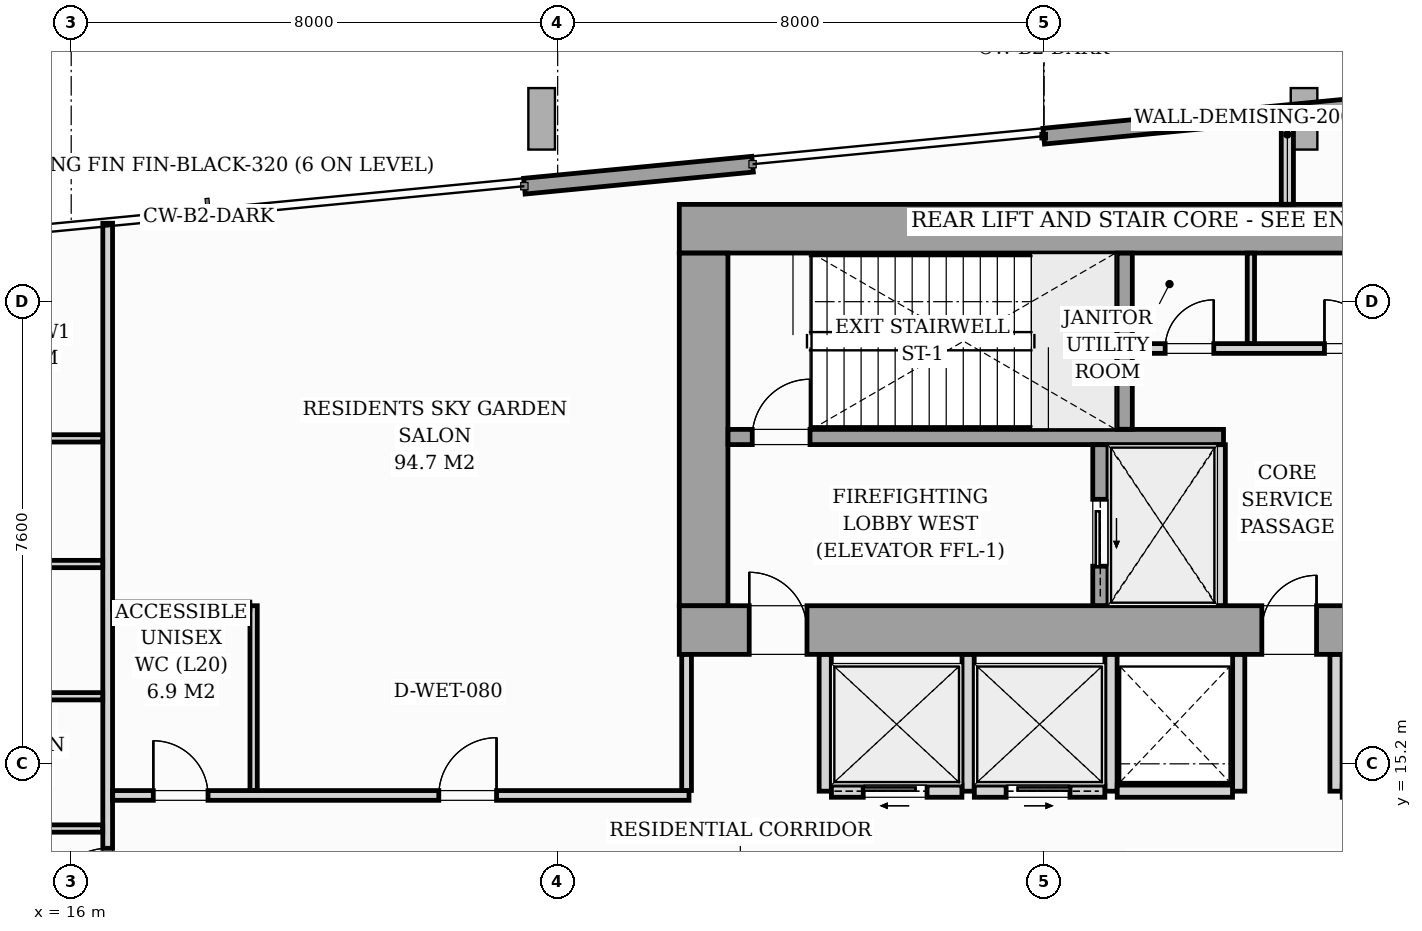
"""IFC4 building model, lengths in metres.
Left out: names, types, materials, properties, quantities, classifications, styles, units other than length and angle.
Written with IfcOpenShell. Run it as: python <this file> out.ifc"""

import sys

from ifc_helpers import new_model, si_unit, direction, frame, frame_2d, origin, origin_2d, place, context, subcontext, project, spatial, rectangle, i_section, extrude, source, transform, mapped, element, fill, save


model = new_model("IFC4")
c1 = context("Model", 3, precision=1e-05, world=origin(), true_north=direction((0.0, 1.0)))
c2 = subcontext(c1, "Body", "Model", "MODEL_VIEW")
j1 = project(units=[si_unit("LENGTHUNIT", "METRE"), si_unit("PLANEANGLEUNIT", "RADIAN")], contexts=[c1])
p1 = place(None, origin())
s1 = spatial("IfcSite", under=j1, at=p1, CompositionType="ELEMENT")
p2 = place(p1, origin())
s2 = spatial("IfcBuilding", under=s1, at=p2, CompositionType="ELEMENT")
p3 = place(p2, frame((0.0, 0.0, 72.6)))
s3 = spatial("IfcBuildingStorey", under=s2, at=p3, CompositionType="ELEMENT", Elevation=72.6)
m1 = source(origin(), c2, "Body", "SweptSolid", [
    extrude(i_section(OverallWidth=0.427, OverallDepth=0.483, WebThickness=0.051, FlangeThickness=0.082, FilletRadius=0.018, at=origin_2d()), origin(), (0.0, 0.0, 1.0), 5.196),
])
for number, where, z_axis, x_axis in (
    (1, (26.4, 17.4, 0.002), (0.0, 0.0, 1.0), (1.0, 0.0, 0.0)),
    (2, (33.12, 17.4, 0.002), (0.0, 0.0, 1.0), (1.0, 0.0, 0.0)),
    (3, (26.4, 24.0, 0.002), (0.0, 0.0, 1.0), (1.0, 0.0, 0.0)),
    (4, (33.12, 24.0, 0.002), (0.0, 0.0, 1.0), (1.0, 0.0, 0.0)),
):
    element("IfcColumn", number, at=place(p3, frame(where, z_axis=z_axis, x_axis=x_axis)), inside=s3, PredefinedType="PILASTER", context=c2, shape_type="MappedRepresentation", body=[
        mapped(m1, transform((0.0, 0.0, 0.0), scale=1.0)),
    ])
m2 = source(origin(), c2, "Body", "SweptSolid", [
    extrude(i_section(OverallWidth=0.438, OverallDepth=1.011, WebThickness=0.041, FlangeThickness=0.074, FilletRadius=0.024, at=origin_2d()), origin(), (0.0, 0.0, 1.0), 5.029),
])
p4 = place(p3, frame((23.253, 25.938, 0.103), z_axis=(0.401019992199, -0.10845988651, 0.909625977463), x_axis=(-0.878077634316, 0.237484919499, 0.415428190094)))
e5 = element("IfcColumn", 5, at=p4, inside=s3, PredefinedType="COLUMN", context=c2, shape_type="MappedRepresentation", body=[
    mapped(m2, transform((0.0, 0.0, 0.0), scale=1.0)),
])
m3 = source(origin(), c2, "Body", "SweptSolid", [
    extrude(i_section(OverallWidth=0.438, OverallDepth=1.011, WebThickness=0.041, FlangeThickness=0.074, FilletRadius=0.024, at=origin_2d()), origin(), (0.0, 0.0, 1.0), 5.27),
])
p5 = place(p3, frame((35.649, 25.935, 0.124), z_axis=(0.499720902571, -0.102566244395, 0.860092544465), x_axis=(-0.84252926259, 0.172926651282, 0.510138035198)))
e6 = element("IfcColumn", 6, at=p5, inside=s3, PredefinedType="COLUMN", context=c2, shape_type="MappedRepresentation", body=[
    mapped(m3, transform((0.0, 0.0, 0.0), scale=1.0)),
])
p6 = place(p3, frame((23.452, 24.699, 0.0), z_axis=(0.0, 0.0, 1.0), x_axis=(0.995396562626, 0.095841969468, 0.0)))
e7 = element("IfcWall", 7, at=p6, inside=s3, PredefinedType="STANDARD", context=c2, shape_type="SweptSolid", body=[
    extrude(rectangle(XDim=3.77, YDim=0.26, at=frame_2d((1.885, 0.0))), origin(), (0.0, 0.0, 1.0), 4.78),
])
p7 = place(p3, frame((31.993, 25.522, 0.0), z_axis=(0.0, 0.0, 1.0), x_axis=(0.99539768453, 0.095830316879, 0.0)))
e8 = element("IfcWall", 8, at=p7, inside=s3, PredefinedType="STANDARD", context=c2, shape_type="SweptSolid", body=[
    extrude(rectangle(XDim=7.22, YDim=0.26, at=frame_2d((3.61, 0.0))), origin(), (0.0, 0.0, 1.0), 4.78),
])
p8 = place(p3, frame((26.0, 17.4, 0.0), z_axis=(0.0, 0.0, 1.0), x_axis=(1.0, 0.0, 0.0)))
e9 = element("IfcWall", 9, at=p8, inside=s3, PredefinedType="SHEAR", context=c2, shape_type="SweptSolid", body=[
    extrude(rectangle(XDim=20.0, YDim=0.8, at=frame_2d((10.0, 0.0))), origin(), (0.0, 0.0, 1.0), 5.2),
])
p9 = place(p8, frame((1.15, 0.0, 0.0)))
e10 = element("IfcOpeningElement", 10, at=p9, cuts=e9, PredefinedType="OPENING", context=c2, shape_type="SweptSolid", body=[
    extrude(rectangle(XDim=0.95, YDim=2.06, at=frame_2d((0.475, 1.03))), frame((0.0, 0.41, 0.0), z_axis=(0.0, -1.0, 0.0), x_axis=(1.0, 0.0, 0.0)), (0.0, 0.0, 1.0), 0.82),
])
p10 = place(p8, frame((9.58, 0.0, 0.0)))
e11 = element("IfcOpeningElement", 11, at=p10, cuts=e9, PredefinedType="OPENING", context=c2, shape_type="SweptSolid", body=[
    extrude(rectangle(XDim=0.9, YDim=2.06, at=frame_2d((0.45, 1.03))), frame((0.0, 0.41, 0.0), z_axis=(0.0, -1.0, 0.0), x_axis=(1.0, 0.0, 0.0)), (0.0, 0.0, 1.0), 0.82),
])
p11 = place(p8, frame((17.75, 0.0, 0.0)))
e12 = element("IfcOpeningElement", 12, at=p11, cuts=e9, PredefinedType="OPENING", context=c2, shape_type="SweptSolid", body=[
    extrude(rectangle(XDim=0.95, YDim=2.06, at=frame_2d((0.475, 1.03))), frame((0.0, 0.41, 0.0), z_axis=(0.0, -1.0, 0.0), x_axis=(1.0, 0.0, 0.0)), (0.0, 0.0, 1.0), 0.82),
])
p12 = place(p3, frame((26.0, 24.0, 0.0), z_axis=(0.0, 0.0, 1.0), x_axis=(1.0, 0.0, 0.0)))
e13 = element("IfcWall", 13, at=p12, inside=s3, PredefinedType="SHEAR", context=c2, shape_type="SweptSolid", body=[
    extrude(rectangle(XDim=20.0, YDim=0.8, at=frame_2d((10.0, 0.0))), origin(), (0.0, 0.0, 1.0), 5.2),
])
p13 = place(p3, frame((26.4, 17.802, 0.0), z_axis=(0.0, 0.0, 1.0), x_axis=(0.0, 1.0, 0.0)))
e14 = element("IfcWall", 14, at=p13, inside=s3, PredefinedType="SHEAR", context=c2, shape_type="SweptSolid", body=[
    extrude(rectangle(XDim=5.796, YDim=0.8, at=frame_2d((2.898, 0.0))), origin(), (0.0, 0.0, 1.0), 5.2),
])
p14 = place(p3, frame((26.802, 20.575, 0.0), z_axis=(0.0, 0.0, 1.0), x_axis=(1.0, 0.0, 0.0)))
e15 = element("IfcWall", 15, at=p14, inside=s3, PredefinedType="SOLIDWALL", context=c2, shape_type="SweptSolid", body=[
    extrude(rectangle(XDim=8.148, YDim=0.25, at=frame_2d((4.074, 0.0))), origin(), (0.0, 0.0, 1.0), 5.2),
])
p15 = place(p14, frame((0.398, 0.0, 0.0)))
e16 = element("IfcOpeningElement", 16, at=p15, cuts=e15, PredefinedType="OPENING", context=c2, shape_type="SweptSolid", body=[
    extrude(rectangle(XDim=0.95, YDim=2.06, at=frame_2d((0.475, 1.03))), frame((0.0, 0.135, 0.0), z_axis=(0.0, -1.0, 0.0), x_axis=(1.0, 0.0, 0.0)), (0.0, 0.0, 1.0), 0.27),
])
p16 = place(p3, frame((33.325, 20.702, 0.0), z_axis=(0.0, 0.0, 1.0), x_axis=(0.0, 1.0, 0.0)))
e17 = element("IfcWall", 17, at=p16, inside=s3, PredefinedType="SOLIDWALL", context=c2, shape_type="SweptSolid", body=[
    extrude(rectangle(XDim=2.896, YDim=0.25, at=frame_2d((1.448, 0.0))), origin(), (0.0, 0.0, 1.0), 5.2),
])
p17 = place(p3, frame((32.925, 17.802, 0.0), z_axis=(0.0, 0.0, 1.0), x_axis=(0.0, 1.0, 0.0)))
e18 = element("IfcWall", 18, at=p17, inside=s3, PredefinedType="SOLIDWALL", context=c2, shape_type="SweptSolid", body=[
    extrude(rectangle(XDim=2.646, YDim=0.25, at=frame_2d((1.323, 0.0))), origin(), (0.0, 0.0, 1.0), 5.2),
])
p18 = place(p17, frame((0.648, 0.0, 0.0)))
e19 = element("IfcOpeningElement", 19, at=p18, cuts=e18, PredefinedType="OPENING", context=c2, shape_type="SweptSolid", body=[
    extrude(rectangle(XDim=1.1, YDim=2.08, at=frame_2d((0.55, 1.04))), frame((0.0, 0.135, 0.0), z_axis=(0.0, -1.0, 0.0), x_axis=(1.0, 0.0, 0.0)), (0.0, 0.0, 1.0), 0.27),
])
p19 = place(p3, frame((34.9, 17.802, 0.0), z_axis=(0.0, 0.0, 1.0), x_axis=(0.0, 1.0, 0.0)))
e20 = element("IfcWall", 20, at=p19, inside=s3, PredefinedType="PARTITIONING", context=c2, shape_type="SweptSolid", body=[
    extrude(rectangle(XDim=2.646, YDim=0.16, at=frame_2d((1.323, 0.0))), origin(), (0.0, 0.0, 1.0), 4.78),
])
p20 = place(p3, frame((33.452, 22.03, 0.0), z_axis=(0.0, 0.0, 1.0), x_axis=(1.0, 0.0, 0.0)))
e21 = element("IfcWall", 21, at=p20, inside=s3, PredefinedType="PARTITIONING", context=c2, shape_type="SweptSolid", body=[
    extrude(rectangle(XDim=5.096, YDim=0.16, at=frame_2d((2.548, 0.0))), origin(), (0.0, 0.0, 1.0), 4.78),
])
p21 = place(p20, frame((0.538, 0.0, 0.0)))
e22 = element("IfcOpeningElement", 22, at=p21, cuts=e21, PredefinedType="OPENING", context=c2, shape_type="SweptSolid", body=[
    extrude(rectangle(XDim=0.8, YDim=2.05, at=frame_2d((0.4, 1.025))), frame((0.0, 0.09, 0.0), z_axis=(0.0, -1.0, 0.0), x_axis=(1.0, 0.0, 0.0)), (0.0, 0.0, 1.0), 0.18),
])
p22 = place(p20, frame((3.158, 0.0, 0.0)))
e23 = element("IfcOpeningElement", 23, at=p22, cuts=e21, PredefinedType="OPENING", context=c2, shape_type="SweptSolid", body=[
    extrude(rectangle(XDim=0.8, YDim=2.05, at=frame_2d((0.4, 1.025))), frame((0.0, 0.09, 0.0), z_axis=(0.0, -1.0, 0.0), x_axis=(1.0, 0.0, 0.0)), (0.0, 0.0, 1.0), 0.18),
])
p23 = place(p3, frame((35.4, 22.112, 0.0), z_axis=(0.0, 0.0, 1.0), x_axis=(0.0, 1.0, 0.0)))
e24 = element("IfcWall", 24, at=p23, inside=s3, PredefinedType="PARTITIONING", context=c2, shape_type="SweptSolid", body=[
    extrude(rectangle(XDim=1.486, YDim=0.12, at=frame_2d((0.743, 0.0))), origin(), (0.0, 0.0, 1.0), 4.78),
])
for number, where, z_axis, x_axis in (
    (25, (28.4, 14.75, 0.0), (0.0, 0.0, 1.0), (0.0, 1.0, 0.0)),
    (26, (30.75, 14.75, 0.0), (0.0, 0.0, 1.0), (0.0, 1.0, 0.0)),
    (27, (33.1, 14.75, 0.0), (0.0, 0.0, 1.0), (0.0, 1.0, 0.0)),
):
    element("IfcWall", number, at=place(p3, frame(where, z_axis=z_axis, x_axis=x_axis)), inside=s3, PredefinedType="PARTITIONING", context=c2, shape_type="SweptSolid", body=[
        extrude(rectangle(XDim=2.248, YDim=0.2, at=frame_2d((1.124, 0.0))), origin(), (0.0, 0.0, 1.0), 4.78),
    ])
p24 = place(p3, frame((28.502, 14.75, 0.0), z_axis=(0.0, 0.0, 1.0), x_axis=(1.0, 0.0, 0.0)))
e28 = element("IfcWall", 28, at=p24, inside=s3, PredefinedType="PARTITIONING", context=c2, shape_type="SweptSolid", body=[
    extrude(rectangle(XDim=2.146, YDim=0.2, at=frame_2d((1.073, 0.0))), origin(), (0.0, 0.0, 1.0), 4.78),
])
p25 = place(p24, frame((0.523, 0.0, 0.0)))
e29 = element("IfcOpeningElement", 29, at=p25, cuts=e28, PredefinedType="OPENING", context=c2, shape_type="SweptSolid", body=[
    extrude(rectangle(XDim=1.05, YDim=2.08, at=frame_2d((0.525, 1.04))), frame((0.0, 0.11, 0.0), z_axis=(0.0, -1.0, 0.0), x_axis=(1.0, 0.0, 0.0)), (0.0, 0.0, 1.0), 0.22),
])
p26 = place(p3, frame((30.852, 14.75, 0.0), z_axis=(0.0, 0.0, 1.0), x_axis=(1.0, 0.0, 0.0)))
e30 = element("IfcWall", 30, at=p26, inside=s3, PredefinedType="PARTITIONING", context=c2, shape_type="SweptSolid", body=[
    extrude(rectangle(XDim=2.146, YDim=0.2, at=frame_2d((1.073, 0.0))), origin(), (0.0, 0.0, 1.0), 4.78),
])
p27 = place(p26, frame((0.523, 0.0, 0.0)))
e31 = element("IfcOpeningElement", 31, at=p27, cuts=e30, PredefinedType="OPENING", context=c2, shape_type="SweptSolid", body=[
    extrude(rectangle(XDim=1.05, YDim=2.08, at=frame_2d((0.525, 1.04))), frame((0.0, 0.11, 0.0), z_axis=(0.0, -1.0, 0.0), x_axis=(1.0, 0.0, 0.0)), (0.0, 0.0, 1.0), 0.22),
])
p28 = place(p3, frame((35.2, 14.75, 0.0), z_axis=(0.0, 0.0, 1.0), x_axis=(0.0, 1.0, 0.0)))
e32 = element("IfcWall", 32, at=p28, inside=s3, PredefinedType="PARTITIONING", context=c2, shape_type="SweptSolid", body=[
    extrude(rectangle(XDim=2.248, YDim=0.2, at=frame_2d((1.124, 0.0))), origin(), (0.0, 0.0, 1.0), 4.78),
])
p29 = place(p3, frame((33.202, 14.75, 0.0), z_axis=(0.0, 0.0, 1.0), x_axis=(1.0, 0.0, 0.0)))
e33 = element("IfcWall", 33, at=p29, inside=s3, PredefinedType="PARTITIONING", context=c2, shape_type="SweptSolid", body=[
    extrude(rectangle(XDim=1.896, YDim=0.2, at=frame_2d((0.948, 0.0))), origin(), (0.0, 0.0, 1.0), 4.78),
])
p30 = place(p3, frame((36.8, 14.75, 0.0), z_axis=(0.0, 0.0, 1.0), x_axis=(0.0, 1.0, 0.0)))
e34 = element("IfcWall", 34, at=p30, inside=s3, PredefinedType="PARTITIONING", context=c2, shape_type="SweptSolid", body=[
    extrude(rectangle(XDim=2.248, YDim=0.2, at=frame_2d((1.124, 0.0))), origin(), (0.0, 0.0, 1.0), 4.78),
])
p31 = place(p3, frame((16.6, 12.432, 0.0), z_axis=(0.0, 0.0, 1.0), x_axis=(0.0, 1.0, 0.0)))
e35 = element("IfcWall", 35, at=p31, inside=s3, PredefinedType="PARTITIONING", context=c2, shape_type="SweptSolid", body=[
    extrude(rectangle(XDim=11.658, YDim=0.16, at=frame_2d((5.829, 0.0))), origin(), (0.0, 0.0, 1.0), 4.78),
])
p32 = place(p31, frame((0.429, 0.0, 0.0)))
e36 = element("IfcOpeningElement", 36, at=p32, cuts=e35, PredefinedType="OPENING", context=c2, shape_type="SweptSolid", body=[
    extrude(rectangle(XDim=0.95, YDim=2.06, at=frame_2d((0.475, 1.03))), frame((0.0, 0.09, 0.0), z_axis=(0.0, -1.0, 0.0), x_axis=(1.0, 0.0, 0.0)), (0.0, 0.0, 1.0), 0.18),
])
p33 = place(p3, frame((36.0, 24.402, 0.0), z_axis=(0.0, 0.0, 1.0), x_axis=(0.0, 1.0, 0.0)))
e37 = element("IfcWall", 37, at=p33, inside=s3, PredefinedType="PARTITIONING", context=c2, shape_type="SweptSolid", body=[
    extrude(rectangle(XDim=1.373, YDim=0.2, at=frame_2d((0.687, 0.0))), origin(), (0.0, 0.0, 1.0), 4.78),
])
for number, where, z_axis, x_axis in (
    (38, (14.262, 16.311, 0.0), (0.0, 0.0, 1.0), (1.0, 0.0, 0.0)),
    (39, (14.262, 14.136, 0.0), (0.0, 0.0, 1.0), (1.0, 0.0, 0.0)),
    (40, (14.262, 18.486, 0.0), (0.0, 0.0, 1.0), (1.0, 0.0, 0.0)),
):
    element("IfcWall", number, at=place(p3, frame(where, z_axis=z_axis, x_axis=x_axis)), inside=s3, PredefinedType="PARTITIONING", context=c2, shape_type="SweptSolid", body=[
        extrude(rectangle(XDim=2.256, YDim=0.12, at=frame_2d((1.128, 0.0))), origin(), (0.0, 0.0, 1.0), 4.78),
    ])
p34 = place(p3, frame((9.116, 20.552, 0.0), z_axis=(0.0, 0.0, 1.0), x_axis=(1.0, 0.0, 0.0)))
e41 = element("IfcWall", 41, at=p34, inside=s3, PredefinedType="PARTITIONING", context=c2, shape_type="SweptSolid", body=[
    extrude(rectangle(XDim=7.402, YDim=0.12, at=frame_2d((3.701, 0.0))), origin(), (0.0, 0.0, 1.0), 4.78),
])
p35 = place(p34, frame((3.761, 0.0, 0.0)))
e42 = element("IfcOpeningElement", 42, at=p35, cuts=e41, PredefinedType="OPENING", context=c2, shape_type="SweptSolid", body=[
    extrude(rectangle(XDim=0.55, YDim=2.0, at=frame_2d((0.275, 1.0))), frame((0.0, 0.07, 0.0), z_axis=(0.0, -1.0, 0.0), x_axis=(1.0, 0.0, 0.0)), (0.0, 0.0, 1.0), 0.14),
])
p36 = place(p3, frame((16.682, 14.68, 0.0), z_axis=(0.0, 0.0, 1.0), x_axis=(1.0, 0.0, 0.0)))
e43 = element("IfcWall", 43, at=p36, inside=s3, PredefinedType="PARTITIONING", context=c2, shape_type="SweptSolid", body=[
    extrude(rectangle(XDim=9.478, YDim=0.16, at=frame_2d((4.739, 0.0))), origin(), (0.0, 0.0, 1.0), 4.78),
])
p37 = place(p36, frame((0.668, 0.0, 0.0)))
e44 = element("IfcOpeningElement", 44, at=p37, cuts=e43, PredefinedType="OPENING", context=c2, shape_type="SweptSolid", body=[
    extrude(rectangle(XDim=0.9, YDim=2.05, at=frame_2d((0.45, 1.025))), frame((0.0, 0.09, 0.0), z_axis=(0.0, -1.0, 0.0), x_axis=(1.0, 0.0, 0.0)), (0.0, 0.0, 1.0), 0.18),
])
p38 = place(p36, frame((5.363, 0.0, 0.0)))
e45 = element("IfcOpeningElement", 45, at=p38, cuts=e43, PredefinedType="OPENING", context=c2, shape_type="SweptSolid", body=[
    extrude(rectangle(XDim=0.95, YDim=2.06, at=frame_2d((0.475, 1.03))), frame((0.0, 0.09, 0.0), z_axis=(0.0, -1.0, 0.0), x_axis=(1.0, 0.0, 0.0)), (0.0, 0.0, 1.0), 0.18),
])
p39 = place(p3, frame((26.12, 14.762, 0.0), z_axis=(0.0, 0.0, 1.0), x_axis=(0.0, 1.0, 0.0)))
e46 = element("IfcWall", 46, at=p39, inside=s3, PredefinedType="PARTITIONING", context=c2, shape_type="SweptSolid", body=[
    extrude(rectangle(XDim=2.236, YDim=0.16, at=frame_2d((1.118, 0.0))), origin(), (0.0, 0.0, 1.0), 4.78),
])
p40 = place(p3, frame((19.0, 14.762, 0.0), z_axis=(0.0, 0.0, 1.0), x_axis=(0.0, 1.0, 0.0)))
e47 = element("IfcWall", 47, at=p40, inside=s3, PredefinedType="PARTITIONING", context=c2, shape_type="SweptSolid", body=[
    extrude(rectangle(XDim=3.038, YDim=0.12, at=frame_2d((1.519, 0.0))), origin(), (0.0, 0.0, 1.0), 4.78),
])
p41 = place(p3, frame((16.682, 17.8, 0.0), z_axis=(0.0, 0.0, 1.0), x_axis=(1.0, 0.0, 0.0)))
e48 = element("IfcWall", 48, at=p41, inside=s3, PredefinedType="PARTITIONING", context=c2, shape_type="SweptSolid", body=[
    extrude(rectangle(XDim=2.256, YDim=0.12, at=frame_2d((1.128, 0.0))), origin(), (0.0, 0.0, 1.0), 4.78),
])
m4 = source(origin(), c2, "Body", "SweptSolid", [
    extrude(rectangle(XDim=0.95, YDim=2.06, at=frame_2d((0.475, 1.03))), frame((0.0, 0.025, 0.0), z_axis=(0.0, -1.0, 0.0), x_axis=(1.0, 0.0, 0.0)), (0.0, 0.0, 1.0), 0.05),
])
p42 = place(p9, origin())
e49 = element("IfcDoor", 49, at=p42, inside=s3, OperationType="SINGLE_SWING_LEFT", PredefinedType="DOOR", context=c2, shape_type="MappedRepresentation", body=[
    mapped(m4, transform((0.0, 0.0, 0.0), scale=1.0)),
])
fill(e10, e49)
m5 = source(origin(), c2, "Body", "SweptSolid", [
    extrude(rectangle(XDim=0.9, YDim=2.06, at=frame_2d((0.45, 1.03))), frame((0.0, 0.025, 0.0), z_axis=(0.0, -1.0, 0.0), x_axis=(1.0, 0.0, 0.0)), (0.0, 0.0, 1.0), 0.05),
])
p43 = place(p10, origin())
e50 = element("IfcDoor", 50, at=p43, inside=s3, OperationType="SINGLE_SWING_RIGHT", PredefinedType="DOOR", context=c2, shape_type="MappedRepresentation", body=[
    mapped(m5, transform((0.0, 0.0, 0.0), scale=1.0)),
])
fill(e11, e50)
p44 = place(p15, origin())
e51 = element("IfcDoor", 51, at=p44, inside=s3, OperationType="SINGLE_SWING_RIGHT", PredefinedType="DOOR", context=c2, shape_type="MappedRepresentation", body=[
    mapped(m4, transform((0.0, 0.0, 0.0), scale=1.0)),
])
fill(e16, e51)
m6 = source(origin(), c2, "Body", "SweptSolid", [
    extrude(rectangle(XDim=1.1, YDim=2.08, at=frame_2d((0.55, 1.04))), frame((0.0, 0.025, 0.0), z_axis=(0.0, -1.0, 0.0), x_axis=(1.0, 0.0, 0.0)), (0.0, 0.0, 1.0), 0.05),
])
p45 = place(p18, origin())
e52 = element("IfcDoor", 52, at=p45, inside=s3, OperationType="SLIDING_TO_LEFT", PredefinedType="DOOR", context=c2, shape_type="MappedRepresentation", body=[
    mapped(m6, transform((0.0, 0.0, 0.0), scale=1.0)),
])
fill(e19, e52)
m7 = source(origin(), c2, "Body", "SweptSolid", [
    extrude(rectangle(XDim=0.8, YDim=2.05, at=frame_2d((0.4, 1.025))), frame((0.0, 0.025, 0.0), z_axis=(0.0, -1.0, 0.0), x_axis=(1.0, 0.0, 0.0)), (0.0, 0.0, 1.0), 0.05),
])
p46 = place(p21, origin())
e53 = element("IfcDoor", 53, at=p46, inside=s3, OperationType="SINGLE_SWING_RIGHT", PredefinedType="DOOR", context=c2, shape_type="MappedRepresentation", body=[
    mapped(m7, transform((0.0, 0.0, 0.0), scale=1.0)),
])
fill(e22, e53)
p47 = place(p22, origin())
e54 = element("IfcDoor", 54, at=p47, inside=s3, OperationType="SINGLE_SWING_LEFT", PredefinedType="DOOR", context=c2, shape_type="MappedRepresentation", body=[
    mapped(m7, transform((0.0, 0.0, 0.0), scale=1.0)),
])
fill(e23, e54)
m8 = source(origin(), c2, "Body", "SweptSolid", [
    extrude(rectangle(XDim=1.05, YDim=2.08, at=frame_2d((0.525, 1.04))), frame((0.0, 0.025, 0.0), z_axis=(0.0, -1.0, 0.0), x_axis=(1.0, 0.0, 0.0)), (0.0, 0.0, 1.0), 0.05),
])
p48 = place(p25, origin())
e55 = element("IfcDoor", 55, at=p48, inside=s3, OperationType="SLIDING_TO_LEFT", PredefinedType="DOOR", context=c2, shape_type="MappedRepresentation", body=[
    mapped(m8, transform((0.0, 0.0, 0.0), scale=1.0)),
])
fill(e29, e55)
p49 = place(p27, origin())
e56 = element("IfcDoor", 56, at=p49, inside=s3, OperationType="SLIDING_TO_RIGHT", PredefinedType="DOOR", context=c2, shape_type="MappedRepresentation", body=[
    mapped(m8, transform((0.0, 0.0, 0.0), scale=1.0)),
])
fill(e31, e56)
m9 = source(origin(), c2, "Body", "SweptSolid", [
    extrude(rectangle(XDim=0.95, YDim=2.06, at=frame_2d((0.475, 1.03))), frame((0.0, 0.025, 0.0), z_axis=(0.0, -1.0, 0.0), x_axis=(1.0, 0.0, 0.0)), (0.0, 0.0, 1.0), 0.05),
])
p50 = place(p32, origin())
e57 = element("IfcDoor", 57, at=p50, inside=s3, OperationType="SINGLE_SWING_LEFT", PredefinedType="DOOR", context=c2, shape_type="MappedRepresentation", body=[
    mapped(m9, transform((0.0, 0.0, 0.0), scale=1.0)),
])
fill(e36, e57)
m10 = source(origin(), c2, "Body", "SweptSolid", [
    extrude(rectangle(XDim=0.9, YDim=2.05, at=frame_2d((0.45, 1.025))), frame((0.0, 0.025, 0.0), z_axis=(0.0, -1.0, 0.0), x_axis=(1.0, 0.0, 0.0)), (0.0, 0.0, 1.0), 0.05),
])
p51 = place(p37, origin())
e58 = element("IfcDoor", 58, at=p51, inside=s3, OperationType="SINGLE_SWING_LEFT", PredefinedType="DOOR", context=c2, shape_type="MappedRepresentation", body=[
    mapped(m10, transform((0.0, 0.0, 0.0), scale=1.0)),
])
fill(e44, e58)
p52 = place(p38, origin())
e59 = element("IfcDoor", 59, at=p52, inside=s3, OperationType="SINGLE_SWING_RIGHT", PredefinedType="DOOR", context=c2, shape_type="MappedRepresentation", body=[
    mapped(m9, transform((0.0, 0.0, 0.0), scale=1.0)),
])
fill(e45, e59)
save(model, sys.argv[1])
